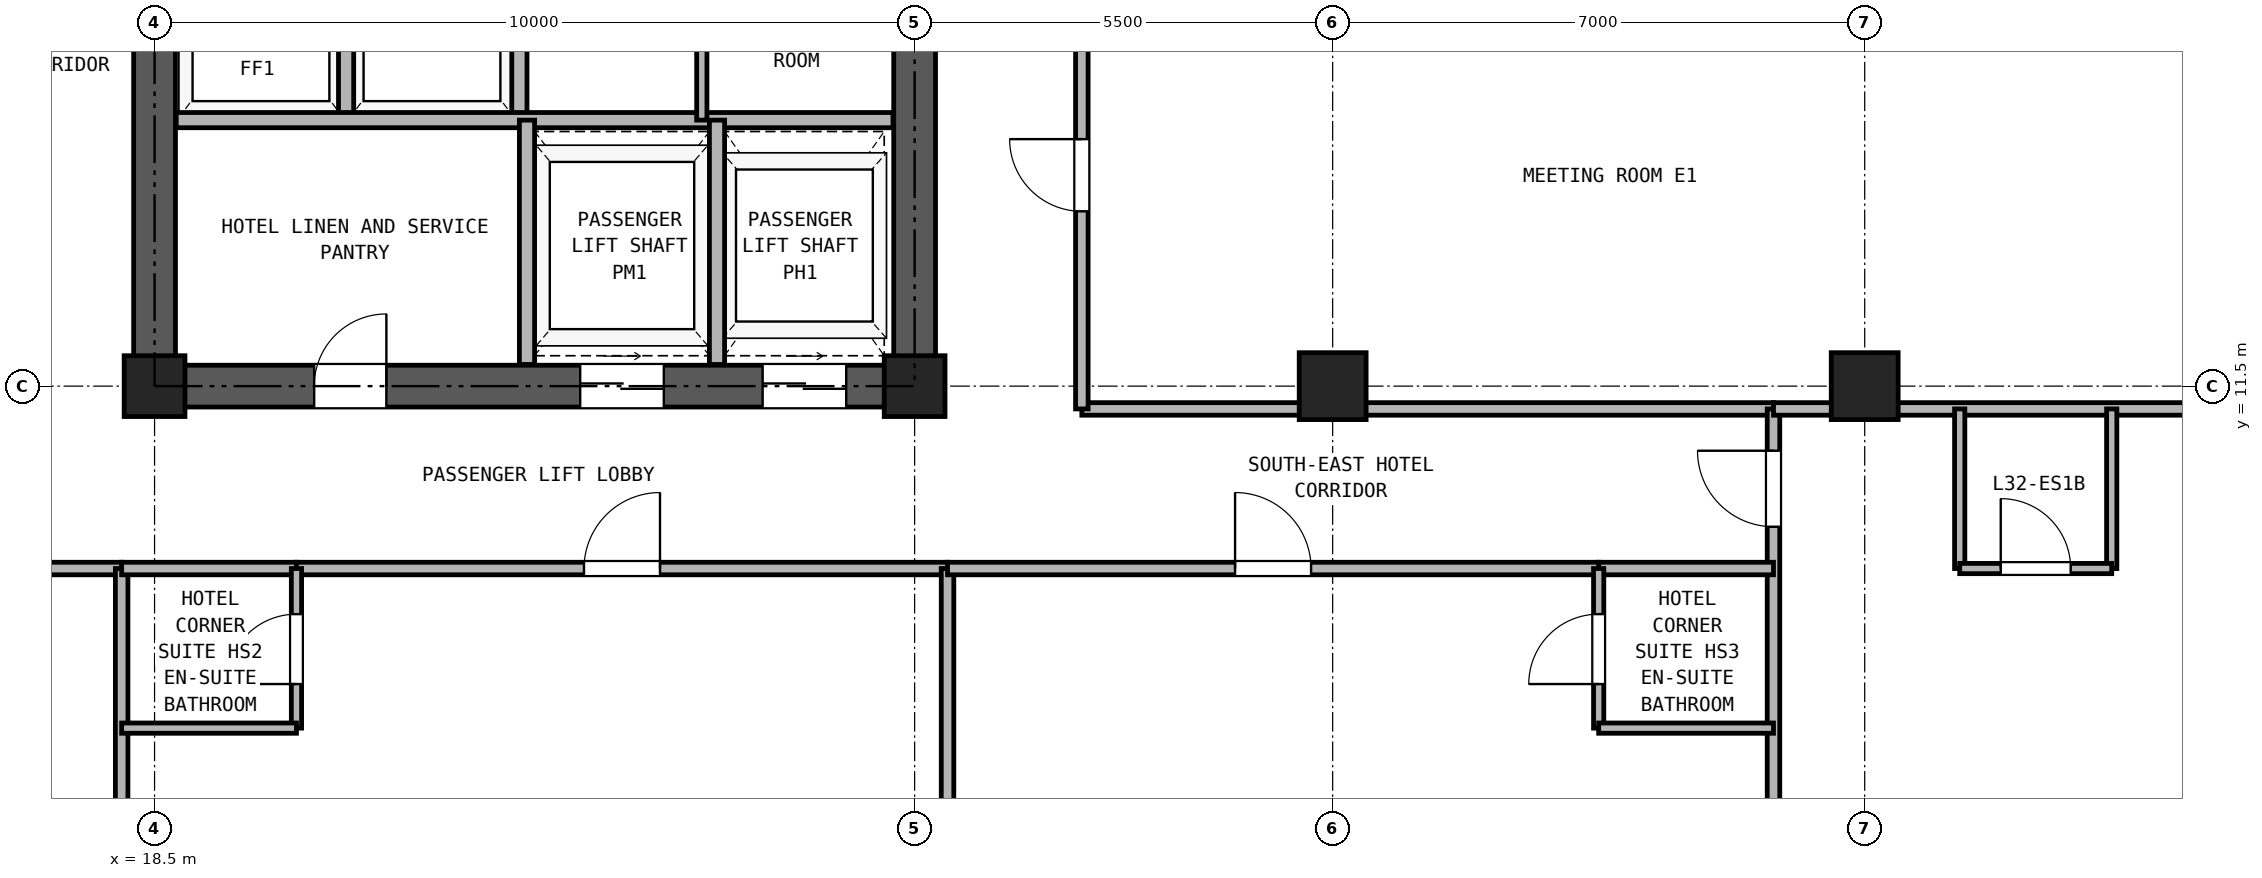
"""IFC4 building model, lengths in metres.
Left out: names, types, materials, properties, quantities, classifications, styles, units other than length and angle.
Written with IfcOpenShell. Run it as: python <this file> out.ifc"""

import sys

from ifc_helpers import new_model, si_unit, direction, frame, frame_2d, origin, origin_2d, place, context, subcontext, project, spatial, rectangle, hollow_rectangle, extrude, source, transform, mapped, element, fill, save


model = new_model("IFC4")
c1 = context("Model", 3, precision=1e-05, world=origin(), true_north=direction((0.0, 1.0)))
c2 = subcontext(c1, "Body", "Model", "MODEL_VIEW")
j1 = project(units=[si_unit("LENGTHUNIT", "METRE"), si_unit("PLANEANGLEUNIT", "RADIAN")], contexts=[c1])
p1 = place(None, origin())
s1 = spatial("IfcSite", under=j1, at=p1, CompositionType="ELEMENT")
p2 = place(p1, origin())
s2 = spatial("IfcBuilding", under=s1, at=p2, CompositionType="ELEMENT")
p3 = place(p2, frame((0.0, 0.0, 118.3)))
s3 = spatial("IfcBuildingStorey", under=s2, at=p3, CompositionType="ELEMENT", Elevation=118.3)
m1 = source(origin(), c2, "Body", "SweptSolid", [
    extrude(hollow_rectangle(XDim=0.8, YDim=0.8, WallThickness=0.045, at=origin_2d()), origin(), (0.0, 0.0, 1.0), 2.95),
])
for number, where, z_axis, x_axis in (
    (1, (18.5, 11.5, 0.0), (0.0, 0.0, 1.0), (1.0, 0.0, 0.0)),
    (2, (28.5, 11.5, 0.0), (0.0, 0.0, 1.0), (1.0, 0.0, 0.0)),
):
    element("IfcColumn", number, at=place(p3, frame(where, z_axis=z_axis, x_axis=x_axis)), inside=s3, PredefinedType="COLUMN", context=c2, shape_type="MappedRepresentation", body=[
        mapped(m1, transform((0.0, 0.0, 0.0), x_axis=(1.0, 0.0, 0.0), y_axis=(0.0, 1.0, 0.0), z_axis=(0.0, 0.0, 1.0), scale=1.0)),
    ])
m2 = source(origin(), c2, "Body", "SweptSolid", [
    extrude(hollow_rectangle(XDim=0.88, YDim=0.88, WallThickness=0.05, at=origin_2d()), origin(), (0.0, 0.0, 1.0), 2.95),
])
for number, where, z_axis, x_axis in (
    (3, (34.0, 11.5, 0.0), (0.0, 0.0, 1.0), (1.0, 0.0, 0.0)),
    (4, (41.0, 11.5, 0.0), (0.0, 0.0, 1.0), (1.0, 0.0, 0.0)),
):
    element("IfcColumn", number, at=place(p3, frame(where, z_axis=z_axis, x_axis=x_axis)), inside=s3, PredefinedType="COLUMN", context=c2, shape_type="MappedRepresentation", body=[
        mapped(m2, transform((0.0, 0.0, 0.0), x_axis=(1.0, 0.0, 0.0), y_axis=(0.0, 1.0, 0.0), z_axis=(0.0, 0.0, 1.0), scale=1.0)),
    ])
p4 = place(p3, frame((18.225, 11.5, 0.0), z_axis=(0.0, 0.0, 1.0), x_axis=(1.0, 0.0, 0.0)))
e5 = element("IfcWall", 5, at=p4, inside=s3, PredefinedType="SHEAR", context=c2, shape_type="SweptSolid", body=[
    extrude(rectangle(XDim=10.55, YDim=0.55, at=frame_2d((5.275, 0.0))), origin(), (0.0, 0.0, 1.0), 2.95),
])
p5 = place(p4, frame((2.375, 0.0, 0.0)))
e6 = element("IfcOpeningElement", 6, at=p5, cuts=e5, PredefinedType="OPENING", context=c2, shape_type="SweptSolid", body=[
    extrude(rectangle(XDim=0.95, YDim=2.15, at=frame_2d((0.475, 1.075))), frame((0.0, 0.285, 0.0), z_axis=(0.0, -1.0, 0.0), x_axis=(1.0, 0.0, 0.0)), (0.0, 0.0, 1.0), 0.57),
])
p6 = place(p4, frame((5.875, 0.0, 0.0)))
e7 = element("IfcOpeningElement", 7, at=p6, cuts=e5, PredefinedType="OPENING", context=c2, shape_type="SweptSolid", body=[
    extrude(rectangle(XDim=1.1, YDim=2.25, at=frame_2d((0.55, 1.125))), frame((0.0, 0.285, 0.0), z_axis=(0.0, -1.0, 0.0), x_axis=(1.0, 0.0, 0.0)), (0.0, 0.0, 1.0), 0.57),
])
p7 = place(p4, frame((8.275, 0.0, 0.0)))
e8 = element("IfcOpeningElement", 8, at=p7, cuts=e5, PredefinedType="OPENING", context=c2, shape_type="SweptSolid", body=[
    extrude(rectangle(XDim=1.1, YDim=2.25, at=frame_2d((0.55, 1.125))), frame((0.0, 0.285, 0.0), z_axis=(0.0, -1.0, 0.0), x_axis=(1.0, 0.0, 0.0)), (0.0, 0.0, 1.0), 0.57),
])
p8 = place(p3, frame((18.5, 11.775, 0.0), z_axis=(0.0, 0.0, 1.0), x_axis=(0.0, 1.0, 0.0)))
e9 = element("IfcWall", 9, at=p8, inside=s3, PredefinedType="SHEAR", context=c2, shape_type="SweptSolid", body=[
    extrude(rectangle(XDim=16.7, YDim=0.55, at=frame_2d((8.35, 0.0))), origin(), (0.0, 0.0, 1.0), 2.95),
])
p9 = place(p8, frame((7.375, 0.0, 0.0)))
e10 = element("IfcOpeningElement", 10, at=p9, cuts=e9, PredefinedType="OPENING", context=c2, shape_type="SweptSolid", body=[
    extrude(rectangle(XDim=1.15, YDim=2.2, at=frame_2d((0.575, 1.1))), frame((0.0, 0.285, 0.0), z_axis=(0.0, -1.0, 0.0), x_axis=(1.0, 0.0, 0.0)), (0.0, 0.0, 1.0), 0.57),
])
p10 = place(p3, frame((28.5, 11.775, 0.0), z_axis=(0.0, 0.0, 1.0), x_axis=(0.0, 1.0, 0.0)))
e11 = element("IfcWall", 11, at=p10, inside=s3, PredefinedType="SHEAR", context=c2, shape_type="SweptSolid", body=[
    extrude(rectangle(XDim=16.7, YDim=0.55, at=frame_2d((8.35, 0.0))), origin(), (0.0, 0.0, 1.0), 2.95),
])
p11 = place(p10, frame((7.375, 0.0, 0.0)))
e12 = element("IfcOpeningElement", 12, at=p11, cuts=e11, PredefinedType="OPENING", context=c2, shape_type="SweptSolid", body=[
    extrude(rectangle(XDim=1.15, YDim=2.2, at=frame_2d((0.575, 1.1))), frame((0.0, 0.285, 0.0), z_axis=(0.0, -1.0, 0.0), x_axis=(1.0, 0.0, 0.0)), (0.0, 0.0, 1.0), 0.57),
])
for number, where, z_axis, x_axis in (
    (13, (21.02, 15.0, 0.0), (0.0, 0.0, 1.0), (0.0, 1.0, 0.0)),
    (14, (23.3, 15.0, 0.0), (0.0, 0.0, 1.0), (0.0, 1.0, 0.0)),
):
    element("IfcWall", number, at=place(p3, frame(where, z_axis=z_axis, x_axis=x_axis)), inside=s3, PredefinedType="PARTITIONING", context=c2, shape_type="SweptSolid", body=[
        extrude(rectangle(XDim=3.0, YDim=0.2, at=frame_2d((1.5, 0.0))), origin(), (0.0, 0.0, 1.0), 2.95),
    ])
p12 = place(p3, frame((18.785, 15.0, 0.0), z_axis=(0.0, 0.0, 1.0), x_axis=(1.0, 0.0, 0.0)))
e15 = element("IfcWall", 15, at=p12, inside=s3, PredefinedType="PARTITIONING", context=c2, shape_type="SweptSolid", body=[
    extrude(rectangle(XDim=9.43, YDim=0.2, at=frame_2d((4.715, 0.0))), origin(), (0.0, 0.0, 1.0), 2.95),
])
p13 = place(p3, frame((25.7, 15.0, 0.0), z_axis=(0.0, 0.0, 1.0), x_axis=(0.0, 1.0, 0.0)))
e16 = element("IfcWall", 16, at=p13, inside=s3, PredefinedType="PARTITIONING", context=c2, shape_type="SweptSolid", body=[
    extrude(rectangle(XDim=3.0, YDim=0.135, at=frame_2d((1.5, 0.0))), origin(), (0.0, 0.0, 1.0), 2.95),
])
for number, where, z_axis, x_axis in (
    (17, (23.4, 11.785, 0.0), (0.0, 0.0, 1.0), (0.0, 1.0, 0.0)),
    (18, (25.9, 11.785, 0.0), (0.0, 0.0, 1.0), (0.0, 1.0, 0.0)),
):
    element("IfcWall", number, at=place(p3, frame(where, z_axis=z_axis, x_axis=x_axis)), inside=s3, PredefinedType="PARTITIONING", context=c2, shape_type="SweptSolid", body=[
        extrude(rectangle(XDim=3.215, YDim=0.2, at=frame_2d((1.607, 0.0))), origin(), (0.0, 0.0, 1.0), 2.95),
    ])
p14 = place(p3, frame((30.7, 11.2, 0.0), z_axis=(0.0, 0.0, 1.0), x_axis=(1.0, 0.0, 0.0)))
e19 = element("IfcWall", 19, at=p14, inside=s3, PredefinedType="PARTITIONING", context=c2, shape_type="SweptSolid", body=[
    extrude(rectangle(XDim=9.1, YDim=0.165, at=frame_2d((4.55, 0.0))), origin(), (0.0, 0.0, 1.0), 2.95),
])
p15 = place(p3, frame((30.7, 11.2, 0.0), z_axis=(0.0, 0.0, 1.0), x_axis=(0.0, 1.0, 0.0)))
e20 = element("IfcWall", 20, at=p15, inside=s3, PredefinedType="PARTITIONING", context=c2, shape_type="SweptSolid", body=[
    extrude(rectangle(XDim=18.75, YDim=0.165, at=frame_2d((9.375, 0.0))), origin(), (0.0, 0.0, 1.0), 2.95),
])
p16 = place(p15, frame((2.6, 0.0, 0.0)))
e21 = element("IfcOpeningElement", 21, at=p16, cuts=e20, PredefinedType="OPENING", context=c2, shape_type="SweptSolid", body=[
    extrude(rectangle(XDim=0.95, YDim=2.15, at=frame_2d((0.475, 1.075))), frame((0.0, 0.093, 0.0), z_axis=(0.0, -1.0, 0.0), x_axis=(1.0, 0.0, 0.0)), (0.0, 0.0, 1.0), 0.185),
])
p17 = place(p15, frame((8.8, 0.0, 0.0)))
e22 = element("IfcOpeningElement", 22, at=p17, cuts=e20, PredefinedType="OPENING", context=c2, shape_type="SweptSolid", body=[
    extrude(rectangle(XDim=0.95, YDim=2.15, at=frame_2d((0.475, 1.075))), frame((0.0, 0.093, 0.0), z_axis=(0.0, -1.0, 0.0), x_axis=(1.0, 0.0, 0.0)), (0.0, 0.0, 1.0), 0.185),
])
p18 = place(p15, frame((15.075, 0.0, 0.0)))
e23 = element("IfcOpeningElement", 23, at=p18, cuts=e20, PredefinedType="OPENING", context=c2, shape_type="SweptSolid", body=[
    extrude(rectangle(XDim=0.95, YDim=2.15, at=frame_2d((0.475, 1.075))), frame((0.0, 0.093, 0.0), z_axis=(0.0, -1.0, 0.0), x_axis=(1.0, 0.0, 0.0)), (0.0, 0.0, 1.0), 0.185),
])
p19 = place(p3, frame((39.8, 0.16, 0.0), z_axis=(0.0, 0.0, 1.0), x_axis=(0.0, 1.0, 0.0)))
e24 = element("IfcWall", 24, at=p19, inside=s3, PredefinedType="PARTITIONING", context=c2, shape_type="SweptSolid", body=[
    extrude(rectangle(XDim=11.04, YDim=0.165, at=frame_2d((5.52, 0.0))), origin(), (0.0, 0.0, 1.0), 2.95),
])
p20 = place(p19, frame((9.49, 0.0, 0.0)))
e25 = element("IfcOpeningElement", 25, at=p20, cuts=e24, PredefinedType="OPENING", context=c2, shape_type="SweptSolid", body=[
    extrude(rectangle(XDim=1.0, YDim=2.15, at=frame_2d((0.5, 1.075))), frame((0.0, 0.093, 0.0), z_axis=(0.0, -1.0, 0.0), x_axis=(1.0, 0.0, 0.0)), (0.0, 0.0, 1.0), 0.185),
])
p21 = place(p3, frame((39.8, 11.2, 0.0), z_axis=(0.0, 0.0, 1.0), x_axis=(1.0, 0.0, 0.0)))
e26 = element("IfcWall", 26, at=p21, inside=s3, PredefinedType="PARTITIONING", context=c2, shape_type="SweptSolid", body=[
    extrude(rectangle(XDim=7.04, YDim=0.165, at=frame_2d((3.52, 0.0))), origin(), (0.0, 0.0, 1.0), 2.95),
])
for number, where, z_axis, x_axis in (
    (27, (42.25, 9.1, 0.0), (0.0, 0.0, 1.0), (0.0, 1.0, 0.0)),
    (28, (44.25, 9.1, 0.0), (0.0, 0.0, 1.0), (0.0, 1.0, 0.0)),
):
    element("IfcWall", number, at=place(p3, frame(where, z_axis=z_axis, x_axis=x_axis)), inside=s3, PredefinedType="PARTITIONING", context=c2, shape_type="SweptSolid", body=[
        extrude(rectangle(XDim=2.1, YDim=0.135, at=frame_2d((1.05, 0.0))), origin(), (0.0, 0.0, 1.0), 2.95),
    ])
p22 = place(p3, frame((42.25, 9.1, 0.0), z_axis=(0.0, 0.0, 1.0), x_axis=(1.0, 0.0, 0.0)))
e29 = element("IfcWall", 29, at=p22, inside=s3, PredefinedType="PARTITIONING", context=c2, shape_type="SweptSolid", body=[
    extrude(rectangle(XDim=2.0, YDim=0.135, at=frame_2d((1.0, 0.0))), origin(), (0.0, 0.0, 1.0), 2.95),
])
p23 = place(p22, frame((0.54, 0.0, 0.0)))
e30 = element("IfcOpeningElement", 30, at=p23, cuts=e29, PredefinedType="OPENING", context=c2, shape_type="SweptSolid", body=[
    extrude(rectangle(XDim=0.92, YDim=2.1, at=frame_2d((0.46, 1.05))), frame((0.0, 0.077, 0.0), z_axis=(0.0, -1.0, 0.0), x_axis=(1.0, 0.0, 0.0)), (0.0, 0.0, 1.0), 0.155),
])
p24 = place(p3, frame((9.5, 9.1, 0.0), z_axis=(0.0, 0.0, 1.0), x_axis=(1.0, 0.0, 0.0)))
e31 = element("IfcWall", 31, at=p24, inside=s3, PredefinedType="PARTITIONING", context=c2, shape_type="SweptSolid", body=[
    extrude(rectangle(XDim=8.567, YDim=0.165, at=frame_2d((4.283, 0.0))), origin(), (0.0, 0.0, 1.0), 2.95),
])
p25 = place(p24, frame((3.784, 0.0, 0.0)))
e32 = element("IfcOpeningElement", 32, at=p25, cuts=e31, PredefinedType="OPENING", context=c2, shape_type="SweptSolid", body=[
    extrude(rectangle(XDim=1.0, YDim=2.15, at=frame_2d((0.5, 1.075))), frame((0.0, 0.093, 0.0), z_axis=(0.0, -1.0, 0.0), x_axis=(1.0, 0.0, 0.0)), (0.0, 0.0, 1.0), 0.185),
])
p26 = place(p3, frame((18.067, 0.16, 0.0), z_axis=(0.0, 0.0, 1.0), x_axis=(0.0, 1.0, 0.0)))
e33 = element("IfcWall", 33, at=p26, inside=s3, PredefinedType="PARTITIONING", context=c2, shape_type="SweptSolid", body=[
    extrude(rectangle(XDim=8.94, YDim=0.165, at=frame_2d((4.47, 0.0))), origin(), (0.0, 0.0, 1.0), 2.95),
])
p27 = place(p3, frame((18.067, 9.1, 0.0), z_axis=(0.0, 0.0, 1.0), x_axis=(1.0, 0.0, 0.0)))
e34 = element("IfcWall", 34, at=p27, inside=s3, PredefinedType="PARTITIONING", context=c2, shape_type="SweptSolid", body=[
    extrude(rectangle(XDim=2.3, YDim=0.165, at=frame_2d((1.15, 0.0))), origin(), (0.0, 0.0, 1.0), 2.95),
])
p28 = place(p3, frame((20.367, 9.1, 0.0), z_axis=(0.0, 0.0, 1.0), x_axis=(1.0, 0.0, 0.0)))
e35 = element("IfcWall", 35, at=p28, inside=s3, PredefinedType="PARTITIONING", context=c2, shape_type="SweptSolid", body=[
    extrude(rectangle(XDim=8.566, YDim=0.165, at=frame_2d((4.283, 0.0))), origin(), (0.0, 0.0, 1.0), 2.95),
])
p29 = place(p28, frame((3.783, 0.0, 0.0)))
e36 = element("IfcOpeningElement", 36, at=p29, cuts=e35, PredefinedType="OPENING", context=c2, shape_type="SweptSolid", body=[
    extrude(rectangle(XDim=1.0, YDim=2.15, at=frame_2d((0.5, 1.075))), frame((0.0, 0.093, 0.0), z_axis=(0.0, -1.0, 0.0), x_axis=(1.0, 0.0, 0.0)), (0.0, 0.0, 1.0), 0.185),
])
p30 = place(p3, frame((20.367, 7.0, 0.0), z_axis=(0.0, 0.0, 1.0), x_axis=(0.0, 1.0, 0.0)))
e37 = element("IfcWall", 37, at=p30, inside=s3, PredefinedType="PARTITIONING", context=c2, shape_type="SweptSolid", body=[
    extrude(rectangle(XDim=2.1, YDim=0.135, at=frame_2d((1.05, 0.0))), origin(), (0.0, 0.0, 1.0), 2.95),
])
p31 = place(p30, frame((0.58, 0.0, 0.0)))
e38 = element("IfcOpeningElement", 38, at=p31, cuts=e37, PredefinedType="OPENING", context=c2, shape_type="SweptSolid", body=[
    extrude(rectangle(XDim=0.92, YDim=2.1, at=frame_2d((0.46, 1.05))), frame((0.0, 0.077, 0.0), z_axis=(0.0, -1.0, 0.0), x_axis=(1.0, 0.0, 0.0)), (0.0, 0.0, 1.0), 0.155),
])
p32 = place(p3, frame((18.067, 7.0, 0.0), z_axis=(0.0, 0.0, 1.0), x_axis=(1.0, 0.0, 0.0)))
e39 = element("IfcWall", 39, at=p32, inside=s3, PredefinedType="PARTITIONING", context=c2, shape_type="SweptSolid", body=[
    extrude(rectangle(XDim=2.3, YDim=0.135, at=frame_2d((1.15, 0.0))), origin(), (0.0, 0.0, 1.0), 2.95),
])
p33 = place(p3, frame((28.933, 0.16, 0.0), z_axis=(0.0, 0.0, 1.0), x_axis=(0.0, 1.0, 0.0)))
e40 = element("IfcWall", 40, at=p33, inside=s3, PredefinedType="PARTITIONING", context=c2, shape_type="SweptSolid", body=[
    extrude(rectangle(XDim=8.94, YDim=0.165, at=frame_2d((4.47, 0.0))), origin(), (0.0, 0.0, 1.0), 2.95),
])
p34 = place(p3, frame((37.5, 9.1, 0.0), z_axis=(0.0, 0.0, 1.0), x_axis=(1.0, 0.0, 0.0)))
e41 = element("IfcWall", 41, at=p34, inside=s3, PredefinedType="PARTITIONING", context=c2, shape_type="SweptSolid", body=[
    extrude(rectangle(XDim=2.3, YDim=0.165, at=frame_2d((1.15, 0.0))), origin(), (0.0, 0.0, 1.0), 2.95),
])
p35 = place(p3, frame((28.933, 9.1, 0.0), z_axis=(0.0, 0.0, 1.0), x_axis=(1.0, 0.0, 0.0)))
e42 = element("IfcWall", 42, at=p35, inside=s3, PredefinedType="PARTITIONING", context=c2, shape_type="SweptSolid", body=[
    extrude(rectangle(XDim=8.567, YDim=0.165, at=frame_2d((4.283, 0.0))), origin(), (0.0, 0.0, 1.0), 2.95),
])
p36 = place(p35, frame((3.783, 0.0, 0.0)))
e43 = element("IfcOpeningElement", 43, at=p36, cuts=e42, PredefinedType="OPENING", context=c2, shape_type="SweptSolid", body=[
    extrude(rectangle(XDim=1.0, YDim=2.15, at=frame_2d((0.5, 1.075))), frame((0.0, 0.093, 0.0), z_axis=(0.0, -1.0, 0.0), x_axis=(1.0, 0.0, 0.0)), (0.0, 0.0, 1.0), 0.185),
])
p37 = place(p3, frame((37.5, 7.0, 0.0), z_axis=(0.0, 0.0, 1.0), x_axis=(0.0, 1.0, 0.0)))
e44 = element("IfcWall", 44, at=p37, inside=s3, PredefinedType="PARTITIONING", context=c2, shape_type="SweptSolid", body=[
    extrude(rectangle(XDim=2.1, YDim=0.135, at=frame_2d((1.05, 0.0))), origin(), (0.0, 0.0, 1.0), 2.95),
])
p38 = place(p37, frame((0.58, 0.0, 0.0)))
e45 = element("IfcOpeningElement", 45, at=p38, cuts=e44, PredefinedType="OPENING", context=c2, shape_type="SweptSolid", body=[
    extrude(rectangle(XDim=0.92, YDim=2.1, at=frame_2d((0.46, 1.05))), frame((0.0, 0.077, 0.0), z_axis=(0.0, -1.0, 0.0), x_axis=(1.0, 0.0, 0.0)), (0.0, 0.0, 1.0), 0.155),
])
p39 = place(p3, frame((37.5, 7.0, 0.0), z_axis=(0.0, 0.0, 1.0), x_axis=(1.0, 0.0, 0.0)))
e46 = element("IfcWall", 46, at=p39, inside=s3, PredefinedType="PARTITIONING", context=c2, shape_type="SweptSolid", body=[
    extrude(rectangle(XDim=2.3, YDim=0.135, at=frame_2d((1.15, 0.0))), origin(), (0.0, 0.0, 1.0), 2.95),
])
p40 = place(p5, frame((0.95, 0.0, 0.0), z_axis=(0.0, 0.0, 1.0), x_axis=(-1.0, 0.0, 0.0)))
e47 = element("IfcDoor", 47, at=p40, inside=s3, OperationType="SINGLE_SWING_RIGHT", PredefinedType="DOOR", context=c2, shape_type="SweptSolid", body=[
    extrude(rectangle(XDim=0.95, YDim=2.15, at=frame_2d((0.475, 1.075))), frame((0.0, 0.025, 0.0), z_axis=(0.0, -1.0, 0.0), x_axis=(1.0, 0.0, 0.0)), (0.0, 0.0, 1.0), 0.05),
])
fill(e6, e47)
p41 = place(p6, frame((1.1, 0.0, 0.0), z_axis=(0.0, 0.0, 1.0), x_axis=(-1.0, 0.0, 0.0)))
e48 = element("IfcDoor", 48, at=p41, inside=s3, OperationType="DOUBLE_DOOR_SLIDING", PredefinedType="DOOR", context=c2, shape_type="SweptSolid", body=[
    extrude(rectangle(XDim=1.1, YDim=2.25, at=frame_2d((0.55, 1.125))), frame((0.0, 0.025, 0.0), z_axis=(0.0, -1.0, 0.0), x_axis=(1.0, 0.0, 0.0)), (0.0, 0.0, 1.0), 0.05),
])
fill(e7, e48)
p42 = place(p7, frame((1.1, 0.0, 0.0), z_axis=(0.0, 0.0, 1.0), x_axis=(-1.0, 0.0, 0.0)))
e49 = element("IfcDoor", 49, at=p42, inside=s3, OperationType="DOUBLE_DOOR_SLIDING", PredefinedType="DOOR", context=c2, shape_type="SweptSolid", body=[
    extrude(rectangle(XDim=1.1, YDim=2.25, at=frame_2d((0.55, 1.125))), frame((0.0, 0.025, 0.0), z_axis=(0.0, -1.0, 0.0), x_axis=(1.0, 0.0, 0.0)), (0.0, 0.0, 1.0), 0.05),
])
fill(e8, e49)
p43 = place(p23, origin())
e50 = element("IfcDoor", 50, at=p43, inside=s3, OperationType="SINGLE_SWING_LEFT", PredefinedType="DOOR", context=c2, shape_type="SweptSolid", body=[
    extrude(rectangle(XDim=0.92, YDim=2.1, at=frame_2d((0.46, 1.05))), frame((0.0, 0.025, 0.0), z_axis=(0.0, -1.0, 0.0), x_axis=(1.0, 0.0, 0.0)), (0.0, 0.0, 1.0), 0.05),
])
fill(e30, e50)
p44 = place(p20, frame((1.0, 0.0, 0.0), z_axis=(0.0, 0.0, 1.0), x_axis=(-1.0, 0.0, 0.0)))
e51 = element("IfcDoor", 51, at=p44, inside=s3, OperationType="SINGLE_SWING_RIGHT", PredefinedType="DOOR", context=c2, shape_type="SweptSolid", body=[
    extrude(rectangle(XDim=1.0, YDim=2.15, at=frame_2d((0.5, 1.075))), frame((0.0, 0.025, 0.0), z_axis=(0.0, -1.0, 0.0), x_axis=(1.0, 0.0, 0.0)), (0.0, 0.0, 1.0), 0.05),
])
fill(e25, e51)
p45 = place(p31, frame((0.92, 0.0, 0.0), z_axis=(0.0, 0.0, 1.0), x_axis=(-1.0, 0.0, 0.0)))
e52 = element("IfcDoor", 52, at=p45, inside=s3, OperationType="SINGLE_SWING_LEFT", PredefinedType="DOOR", context=c2, shape_type="SweptSolid", body=[
    extrude(rectangle(XDim=0.92, YDim=2.1, at=frame_2d((0.46, 1.05))), frame((0.0, 0.025, 0.0), z_axis=(0.0, -1.0, 0.0), x_axis=(1.0, 0.0, 0.0)), (0.0, 0.0, 1.0), 0.05),
])
fill(e38, e52)
p46 = place(p29, frame((1.0, 0.0, 0.0), z_axis=(0.0, 0.0, 1.0), x_axis=(-1.0, 0.0, 0.0)))
e53 = element("IfcDoor", 53, at=p46, inside=s3, OperationType="SINGLE_SWING_RIGHT", PredefinedType="DOOR", context=c2, shape_type="SweptSolid", body=[
    extrude(rectangle(XDim=1.0, YDim=2.15, at=frame_2d((0.5, 1.075))), frame((0.0, 0.025, 0.0), z_axis=(0.0, -1.0, 0.0), x_axis=(1.0, 0.0, 0.0)), (0.0, 0.0, 1.0), 0.05),
])
fill(e36, e53)
p47 = place(p38, origin())
e54 = element("IfcDoor", 54, at=p47, inside=s3, OperationType="SINGLE_SWING_LEFT", PredefinedType="DOOR", context=c2, shape_type="SweptSolid", body=[
    extrude(rectangle(XDim=0.92, YDim=2.1, at=frame_2d((0.46, 1.05))), frame((0.0, 0.025, 0.0), z_axis=(0.0, -1.0, 0.0), x_axis=(1.0, 0.0, 0.0)), (0.0, 0.0, 1.0), 0.05),
])
fill(e45, e54)
p48 = place(p36, frame((1.0, 0.0, 0.0), z_axis=(0.0, 0.0, 1.0), x_axis=(-1.0, 0.0, 0.0)))
e55 = element("IfcDoor", 55, at=p48, inside=s3, OperationType="SINGLE_SWING_LEFT", PredefinedType="DOOR", context=c2, shape_type="SweptSolid", body=[
    extrude(rectangle(XDim=1.0, YDim=2.15, at=frame_2d((0.5, 1.075))), frame((0.0, 0.025, 0.0), z_axis=(0.0, -1.0, 0.0), x_axis=(1.0, 0.0, 0.0)), (0.0, 0.0, 1.0), 0.05),
])
fill(e43, e55)
p49 = place(p16, origin())
e56 = element("IfcDoor", 56, at=p49, inside=s3, OperationType="SINGLE_SWING_RIGHT", PredefinedType="DOOR", context=c2, shape_type="SweptSolid", body=[
    extrude(rectangle(XDim=0.95, YDim=2.15, at=frame_2d((0.475, 1.075))), frame((0.0, 0.025, 0.0), z_axis=(0.0, -1.0, 0.0), x_axis=(1.0, 0.0, 0.0)), (0.0, 0.0, 1.0), 0.05),
])
fill(e21, e56)
save(model, sys.argv[1])
